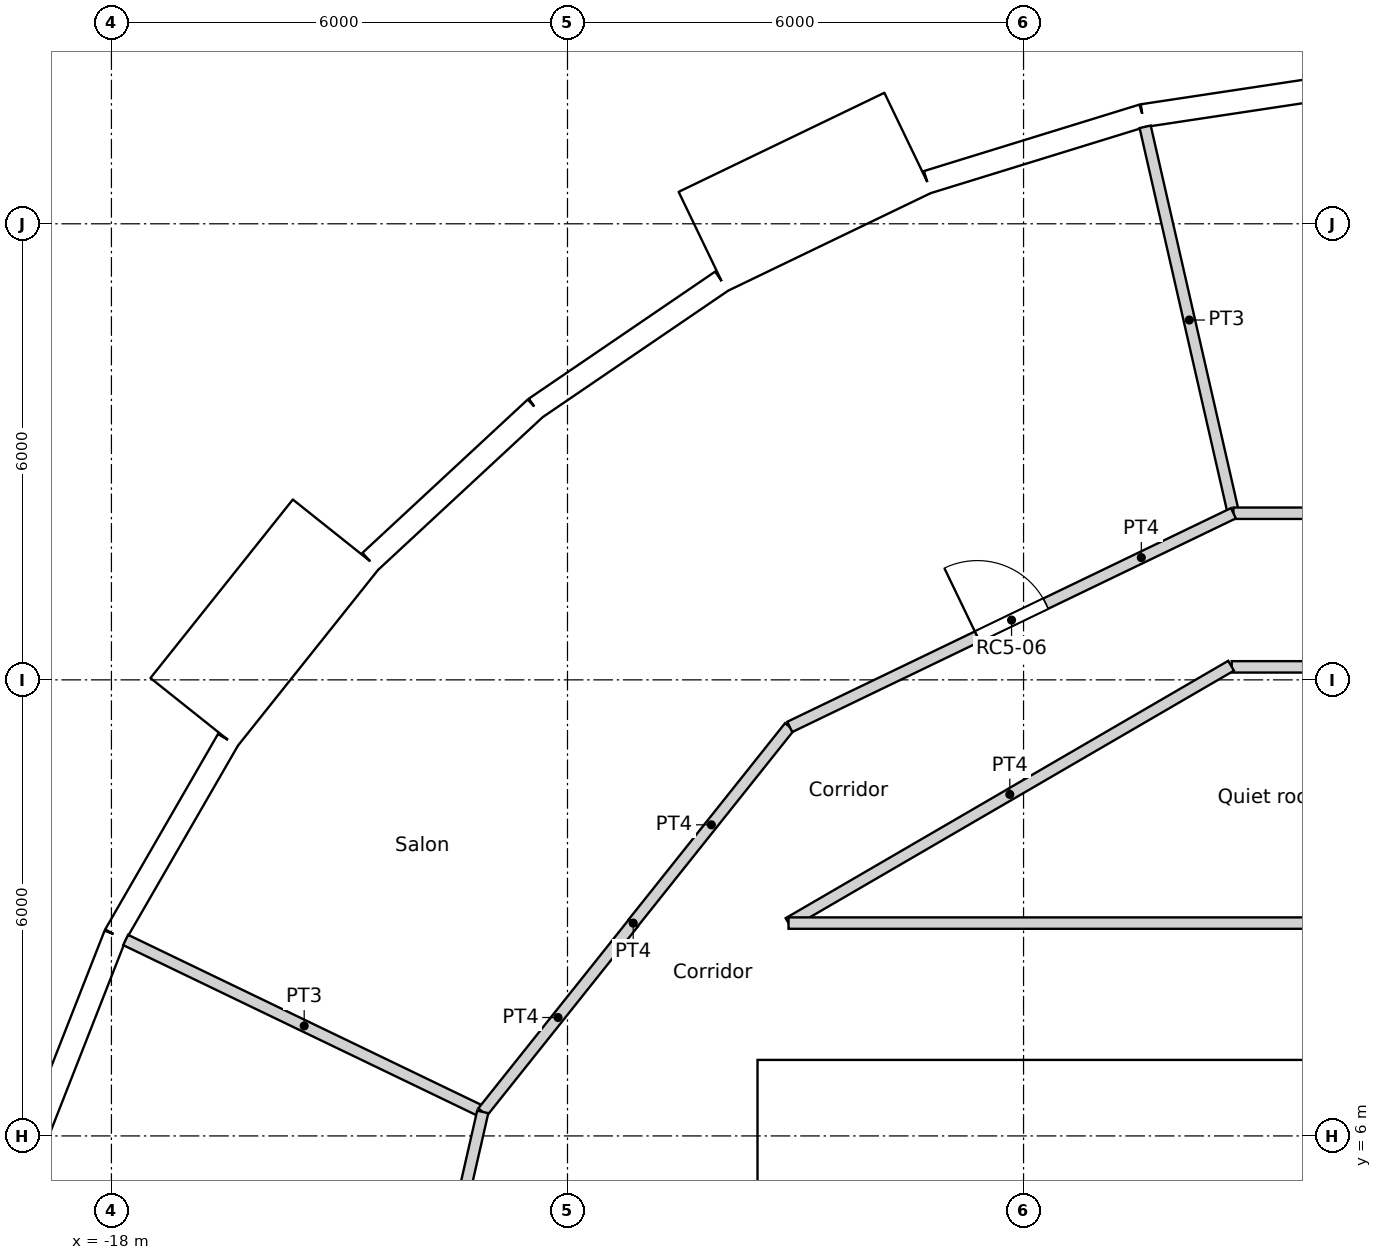
"""IFC4 building model, lengths in metres.
Left out: names, types, materials, properties, quantities, classifications, styles, units other than length and angle.
Written with IfcOpenShell. Run it as: python <this file> out.ifc"""

import sys

from ifc_helpers import new_model, si_unit, direction, frame, frame_2d, origin, origin_2d, place, context, subcontext, project, spatial, rectangle, circle, extrude, element, fill, save


model = new_model("IFC4")
c1 = context("Model", 3, precision=1e-05, world=origin(), true_north=direction((0.0, 1.0)))
c2 = subcontext(c1, "Body", "Model", "MODEL_VIEW")
j1 = project(units=[si_unit("LENGTHUNIT", "METRE"), si_unit("PLANEANGLEUNIT", "RADIAN")], contexts=[c1])
p1 = place(None, origin())
s1 = spatial("IfcSite", under=j1, at=p1, CompositionType="ELEMENT")
p2 = place(p1, origin())
s2 = spatial("IfcBuilding", under=s1, at=p2, CompositionType="ELEMENT")
p3 = place(p2, frame((0.0, 0.0, 270.6)))
s3 = spatial("IfcBuildingStorey", under=s2, at=p3, CompositionType="ELEMENT", Elevation=270.6)
for number, where, z_axis, x_axis in (
    (1, (-4.188, 18.35, 0.0), (0.0, 0.0, 1.0), (1.0, 0.0, 0.0)),
    (2, (-9.411, 16.301, 0.0), (0.0, 0.0, 1.0), (1.0, 0.0, 0.0)),
    (3, (-13.798, 12.802, 0.0), (0.0, 0.0, 1.0), (1.0, 0.0, 0.0)),
    (4, (-16.958, 8.167, 0.0), (0.0, 0.0, 1.0), (1.0, 0.0, 0.0)),
):
    element("IfcColumn", number, at=place(p3, frame(where, z_axis=z_axis, x_axis=x_axis)), inside=s3, PredefinedType="COLUMN", context=c2, shape_type="SweptSolid", body=[
        extrude(circle(Radius=0.55, at=origin_2d()), origin(), (0.0, 0.0, 1.0), 3.6),
    ])
p4 = place(p3, frame((-1.504, 19.864, 0.0), z_axis=(0.0, 0.0, 1.0), x_axis=(-0.988835775663, -0.149009425104, 0.0)))
e5 = element("IfcWall", 5, at=p4, inside=s3, PredefinedType="SOLIDWALL", context=c2, shape_type="SweptSolid", body=[
    extrude(rectangle(XDim=2.962, YDim=0.3, at=frame_2d((1.481, 0.0))), origin(), (0.0, 0.0, 1.0), 3.25),
])
p5 = place(p4, frame((1.481, 0.0, 1.55)))
e6 = element("IfcOpeningElement", 6, at=p5, cuts=e5, PredefinedType="OPENING", context=c2, shape_type="SweptSolid", body=[
    extrude(circle(Radius=0.9, at=origin_2d()), frame((0.0, 0.16, 0.0), z_axis=(0.0, -1.0, 0.0), x_axis=(1.0, 0.0, 0.0)), (0.0, 0.0, 1.0), 0.32),
])
p6 = place(p3, frame((-4.433, 19.422, 0.0), z_axis=(0.0, 0.0, 1.0), x_axis=(-0.955555982805, -0.29480970765, 0.0)))
e7 = element("IfcWall", 7, at=p6, inside=s3, PredefinedType="SOLIDWALL", context=c2, shape_type="SweptSolid", body=[
    extrude(rectangle(XDim=2.962, YDim=0.3, at=frame_2d((1.481, 0.0))), origin(), (0.0, 0.0, 1.0), 3.25),
])
p7 = place(p6, frame((1.481, 0.0, 1.55)))
e8 = element("IfcOpeningElement", 8, at=p7, cuts=e7, PredefinedType="OPENING", context=c2, shape_type="SweptSolid", body=[
    extrude(circle(Radius=0.9, at=origin_2d()), frame((0.0, 0.16, 0.0), z_axis=(0.0, -1.0, 0.0), x_axis=(1.0, 0.0, 0.0)), (0.0, 0.0, 1.0), 0.32),
])
p8 = place(p3, frame((-7.518, 19.068, -0.35), z_axis=(0.0, 0.0, 1.0), x_axis=(-0.900953362039, -0.433915935904, 0.0)))
e9 = element("IfcWall", 9, at=p8, inside=s3, PredefinedType="ELEMENTEDWALL", context=c2, shape_type="SweptSolid", body=[
    extrude(rectangle(XDim=3.0, YDim=1.45, at=frame_2d((1.5, 0.0))), origin(), (0.0, 0.0, 1.0), 3.6),
])
p9 = place(p8, frame((1.5, 0.0, 1.9)))
e10 = element("IfcOpeningElement", 10, at=p9, cuts=e9, PredefinedType="OPENING", context=c2, shape_type="SweptSolid", body=[
    extrude(circle(Radius=0.9, at=origin_2d()), frame((0.0, 0.735, 0.0), z_axis=(0.0, -1.0, 0.0), x_axis=(1.0, 0.0, 0.0)), (0.0, 0.0, 1.0), 1.47),
])
p10 = place(p3, frame((-9.974, 17.244, 0.0), z_axis=(0.0, 0.0, 1.0), x_axis=(-0.826236061068, -0.563324037646, 0.0)))
e11 = element("IfcWall", 11, at=p10, inside=s3, PredefinedType="SOLIDWALL", context=c2, shape_type="SweptSolid", body=[
    extrude(rectangle(XDim=2.962, YDim=0.3, at=frame_2d((1.481, 0.0))), origin(), (0.0, 0.0, 1.0), 3.25),
])
p11 = place(p10, frame((1.481, 0.0, 1.55)))
e12 = element("IfcOpeningElement", 12, at=p11, cuts=e11, PredefinedType="OPENING", context=c2, shape_type="SweptSolid", body=[
    extrude(circle(Radius=0.9, at=origin_2d()), frame((0.0, 0.16, 0.0), z_axis=(0.0, -1.0, 0.0), x_axis=(1.0, 0.0, 0.0)), (0.0, 0.0, 1.0), 0.32),
])
p12 = place(p3, frame((-12.421, 15.575, 0.0), z_axis=(0.0, 0.0, 1.0), x_axis=(-0.733028283666, -0.680198158882, 0.0)))
e13 = element("IfcWall", 13, at=p12, inside=s3, PredefinedType="SOLIDWALL", context=c2, shape_type="SweptSolid", body=[
    extrude(rectangle(XDim=2.962, YDim=0.3, at=frame_2d((1.481, 0.0))), origin(), (0.0, 0.0, 1.0), 3.25),
])
p13 = place(p12, frame((1.481, 0.0, 1.55)))
e14 = element("IfcOpeningElement", 14, at=p13, cuts=e13, PredefinedType="OPENING", context=c2, shape_type="SweptSolid", body=[
    extrude(circle(Radius=0.9, at=origin_2d()), frame((0.0, 0.16, 0.0), z_axis=(0.0, -1.0, 0.0), x_axis=(1.0, 0.0, 0.0)), (0.0, 0.0, 1.0), 0.32),
])
p14 = place(p3, frame((-15.046, 13.917, -0.35), z_axis=(0.0, 0.0, 1.0), x_axis=(-0.623523286312, -0.781804778335, 0.0)))
e15 = element("IfcWall", 15, at=p14, inside=s3, PredefinedType="ELEMENTEDWALL", context=c2, shape_type="SweptSolid", body=[
    extrude(rectangle(XDim=3.0, YDim=1.45, at=frame_2d((1.5, 0.0))), origin(), (0.0, 0.0, 1.0), 3.6),
])
p15 = place(p14, frame((1.5, 0.0, 1.9)))
e16 = element("IfcOpeningElement", 16, at=p15, cuts=e15, PredefinedType="OPENING", context=c2, shape_type="SweptSolid", body=[
    extrude(circle(Radius=0.9, at=origin_2d()), frame((0.0, 0.735, 0.0), z_axis=(0.0, -1.0, 0.0), x_axis=(1.0, 0.0, 0.0)), (0.0, 0.0, 1.0), 1.47),
])
p16 = place(p3, frame((-16.468, 11.209, 0.0), z_axis=(0.0, 0.0, 1.0), x_axis=(-0.500012570604, -0.866018146021, 0.0)))
e17 = element("IfcWall", 17, at=p16, inside=s3, PredefinedType="SOLIDWALL", context=c2, shape_type="SweptSolid", body=[
    extrude(rectangle(XDim=2.962, YDim=0.3, at=frame_2d((1.481, 0.0))), origin(), (0.0, 0.0, 1.0), 3.25),
])
p17 = place(p16, frame((1.481, 0.0, 1.55)))
e18 = element("IfcOpeningElement", 18, at=p17, cuts=e17, PredefinedType="OPENING", context=c2, shape_type="SweptSolid", body=[
    extrude(circle(Radius=0.9, at=origin_2d()), frame((0.0, 0.16, 0.0), z_axis=(0.0, -1.0, 0.0), x_axis=(1.0, 0.0, 0.0)), (0.0, 0.0, 1.0), 0.32),
])
p18 = place(p3, frame((-17.949, 8.644, 0.0), z_axis=(0.0, 0.0, 1.0), x_axis=(-0.365343821297, -0.930872650925, 0.0)))
e19 = element("IfcWall", 19, at=p18, inside=s3, PredefinedType="SOLIDWALL", context=c2, shape_type="SweptSolid", body=[
    extrude(rectangle(XDim=2.962, YDim=0.3, at=frame_2d((1.481, 0.0))), origin(), (0.0, 0.0, 1.0), 3.25),
])
p19 = place(p18, frame((1.481, 0.0, 1.55)))
e20 = element("IfcOpeningElement", 20, at=p19, cuts=e19, PredefinedType="OPENING", context=c2, shape_type="SweptSolid", body=[
    extrude(circle(Radius=0.9, at=origin_2d()), frame((0.0, 0.16, 0.0), z_axis=(0.0, -1.0, 0.0), x_axis=(1.0, 0.0, 0.0)), (0.0, 0.0, 1.0), 0.32),
])
p20 = place(p3, frame((-9.5, 6.7, 0.0), z_axis=(0.0, 0.0, 1.0), x_axis=(1.0, 0.0, 0.0)))
e21 = element("IfcWall", 21, at=p20, inside=s3, PredefinedType="SOLIDWALL", context=c2, shape_type="SweptSolid", body=[
    extrude(rectangle(XDim=19.0, YDim=0.6, at=frame_2d((9.5, 0.0))), origin(), (0.0, 0.0, 1.0), 3.6),
])
p21 = place(p20, frame((5.35, 0.0, 0.0)))
e22 = element("IfcOpeningElement", 22, at=p21, cuts=e21, PredefinedType="OPENING", context=c2, shape_type="SweptSolid", body=[
    extrude(rectangle(XDim=1.7, YDim=2.1, at=frame_2d((0.85, 1.05))), frame((0.0, 0.3, 0.0), z_axis=(0.0, -1.0, 0.0), x_axis=(1.0, 0.0, 0.0)), (0.0, 0.0, 1.0), 0.6),
])
p22 = place(p3, frame((-9.2, -6.4, 0.0), z_axis=(0.0, 0.0, 1.0), x_axis=(0.0, 1.0, 0.0)))
e23 = element("IfcWall", 23, at=p22, inside=s3, PredefinedType="SOLIDWALL", context=c2, shape_type="SweptSolid", body=[
    extrude(rectangle(XDim=12.8, YDim=0.6, at=frame_2d((6.4, 0.0))), origin(), (0.0, 0.0, 1.0), 3.6),
])
p23 = place(p3, frame((-2.25, 3.25, 0.0), z_axis=(0.0, 0.0, 1.0), x_axis=(0.0, 1.0, 0.0)))
e24 = element("IfcWall", 24, at=p23, inside=s3, PredefinedType="SOLIDWALL", context=c2, shape_type="SweptSolid", body=[
    extrude(rectangle(XDim=3.15, YDim=0.3, at=frame_2d((1.575, 0.0))), origin(), (0.0, 0.0, 1.0), 3.25),
])
p24 = place(p3, frame((-9.092, 8.8, 0.0), z_axis=(0.0, 0.0, 1.0), x_axis=(0.864470922103, 0.502682827277, 0.0)))
e25 = element("IfcWall", 25, at=p24, inside=s3, PredefinedType="PARTITIONING", context=c2, shape_type="SweptSolid", body=[
    extrude(rectangle(XDim=6.735, YDim=0.15, at=frame_2d((3.368, 0.0))), origin(), (0.0, 0.0, 1.0), 3.1),
])
p25 = place(p3, frame((-9.092, 8.8, 0.0), z_axis=(0.0, 0.0, 1.0), x_axis=(1.0, 0.0, 0.0)))
e26 = element("IfcWall", 26, at=p25, inside=s3, PredefinedType="PARTITIONING", context=c2, shape_type="SweptSolid", body=[
    extrude(rectangle(XDim=18.193, YDim=0.15, at=frame_2d((9.096, 0.0))), origin(), (0.0, 0.0, 1.0), 3.1),
])
p26 = place(p25, frame((8.592, 0.0, 0.0)))
e27 = element("IfcOpeningElement", 27, at=p26, cuts=e26, PredefinedType="OPENING", context=c2, shape_type="SweptSolid", body=[
    extrude(rectangle(XDim=1.0, YDim=2.04, at=frame_2d((0.5, 1.02))), frame((0.0, 0.075, 0.0), z_axis=(0.0, -1.0, 0.0), x_axis=(1.0, 0.0, 0.0)), (0.0, 0.0, 1.0), 0.15),
])
p27 = place(p3, frame((-11.134, 8.8, 0.0), z_axis=(0.0, 0.0, 1.0), x_axis=(-1.0, 0.0, 0.0)))
e28 = element("IfcWall", 28, at=p27, inside=s3, PredefinedType="PARTITIONING", context=c2, shape_type="SweptSolid", body=[
    extrude(rectangle(XDim=0.003, YDim=0.15, at=frame_2d((0.001, 0.0))), origin(), (0.0, 0.0, 1.0), 3.1),
])
p28 = place(p3, frame((-11.136, 8.802, 0.0), z_axis=(0.0, 0.0, 1.0), x_axis=(0.623151397235, 0.782101231379, 0.0)))
e29 = element("IfcWall", 29, at=p28, inside=s3, PredefinedType="PARTITIONING", context=c2, shape_type="SweptSolid", body=[
    extrude(rectangle(XDim=3.301, YDim=0.15, at=frame_2d((1.65, 0.0))), origin(), (0.0, 0.0, 1.0), 3.1),
])
p29 = place(p3, frame((-3.261, 12.171, 0.0), z_axis=(0.0, 0.0, 1.0), x_axis=(1.0, 0.0, 0.0)))
e30 = element("IfcWall", 30, at=p29, inside=s3, PredefinedType="PARTITIONING", context=c2, shape_type="SweptSolid", body=[
    extrude(rectangle(XDim=6.522, YDim=0.15, at=frame_2d((3.261, 0.0))), origin(), (0.0, 0.0, 1.0), 3.1),
])
p30 = place(p3, frame((-3.239, 14.192, 0.0), z_axis=(0.0, 0.0, 1.0), x_axis=(1.0, 0.0, 0.0)))
e31 = element("IfcWall", 31, at=p30, inside=s3, PredefinedType="PARTITIONING", context=c2, shape_type="SweptSolid", body=[
    extrude(rectangle(XDim=6.478, YDim=0.15, at=frame_2d((3.239, 0.0))), origin(), (0.0, 0.0, 1.0), 3.1),
])
p31 = place(p3, frame((-9.076, 11.381, 0.0), z_axis=(0.0, 0.0, 1.0), x_axis=(0.900976027191, 0.433868872388, 0.0)))
e32 = element("IfcWall", 32, at=p31, inside=s3, PredefinedType="PARTITIONING", context=c2, shape_type="SweptSolid", body=[
    extrude(rectangle(XDim=6.479, YDim=0.15, at=frame_2d((3.239, 0.0))), origin(), (0.0, 0.0, 1.0), 3.1),
])
p32 = place(p31, frame((2.739, 0.0, 0.0)))
e33 = element("IfcOpeningElement", 33, at=p32, cuts=e32, PredefinedType="OPENING", context=c2, shape_type="SweptSolid", body=[
    extrude(rectangle(XDim=1.0, YDim=2.04, at=frame_2d((0.5, 1.02))), frame((0.0, 0.075, 0.0), z_axis=(0.0, -1.0, 0.0), x_axis=(1.0, 0.0, 0.0)), (0.0, 0.0, 1.0), 0.15),
])
p33 = place(p3, frame((-13.115, 6.316, 0.0), z_axis=(0.0, 0.0, 1.0), x_axis=(0.623476099415, 0.781842409606, 0.0)))
e34 = element("IfcWall", 34, at=p33, inside=s3, PredefinedType="PARTITIONING", context=c2, shape_type="SweptSolid", body=[
    extrude(rectangle(XDim=3.177, YDim=0.15, at=frame_2d((1.589, 0.0))), origin(), (0.0, 0.0, 1.0), 3.1),
])
p34 = place(p3, frame((-14.557, 0.0, 0.0), z_axis=(0.0, 0.0, 1.0), x_axis=(0.222568978642, 0.97491694505, 0.0)))
e35 = element("IfcWall", 35, at=p34, inside=s3, PredefinedType="PARTITIONING", context=c2, shape_type="SweptSolid", body=[
    extrude(rectangle(XDim=6.479, YDim=0.15, at=frame_2d((3.239, 0.0))), origin(), (0.0, 0.0, 1.0), 3.1),
])
p35 = place(p3, frame((-4.4, 19.276, 0.0), z_axis=(0.0, 0.0, 1.0), x_axis=(0.222612505682, -0.974907007008, 0.0)))
e36 = element("IfcWall", 36, at=p35, inside=s3, PredefinedType="PARTITIONING", context=c2, shape_type="SweptSolid", body=[
    extrude(rectangle(XDim=5.215, YDim=0.15, at=frame_2d((2.607, 0.0))), origin(), (0.0, 0.0, 1.0), 3.1),
])
p36 = place(p3, frame((-17.813, 8.578, 0.0), z_axis=(0.0, 0.0, 1.0), x_axis=(0.901004381064, -0.433809987557, 0.0)))
e37 = element("IfcWall", 37, at=p36, inside=s3, PredefinedType="PARTITIONING", context=c2, shape_type="SweptSolid", body=[
    extrude(rectangle(XDim=5.214, YDim=0.15, at=frame_2d((2.607, 0.0))), origin(), (0.0, 0.0, 1.0), 3.1),
])
p37 = place(p5, origin())
e38 = element("IfcWindow", 38, at=p37, inside=s3, PartitioningType="SINGLE_PANEL", PredefinedType="WINDOW", context=c2, shape_type="SweptSolid", body=[
    extrude(circle(Radius=0.9, at=origin_2d()), frame((0.0, 0.12, 0.0), z_axis=(0.0, -1.0, 0.0), x_axis=(1.0, 0.0, 0.0)), (0.0, 0.0, 1.0), 0.1),
])
fill(e6, e38)
p38 = place(p7, origin())
e39 = element("IfcWindow", 39, at=p38, inside=s3, PartitioningType="SINGLE_PANEL", PredefinedType="WINDOW", context=c2, shape_type="SweptSolid", body=[
    extrude(circle(Radius=0.9, at=origin_2d()), frame((0.0, 0.12, 0.0), z_axis=(0.0, -1.0, 0.0), x_axis=(1.0, 0.0, 0.0)), (0.0, 0.0, 1.0), 0.1),
])
fill(e8, e39)
p39 = place(p9, origin())
e40 = element("IfcWindow", 40, at=p39, inside=s3, PartitioningType="SINGLE_PANEL", PredefinedType="WINDOW", context=c2, shape_type="SweptSolid", body=[
    extrude(circle(Radius=0.9, at=origin_2d()), frame((0.0, 0.695, 0.0), z_axis=(0.0, -1.0, 0.0), x_axis=(1.0, 0.0, 0.0)), (0.0, 0.0, 1.0), 0.1),
])
fill(e10, e40)
p40 = place(p11, origin())
e41 = element("IfcWindow", 41, at=p40, inside=s3, PartitioningType="SINGLE_PANEL", PredefinedType="WINDOW", context=c2, shape_type="SweptSolid", body=[
    extrude(circle(Radius=0.9, at=origin_2d()), frame((0.0, 0.12, 0.0), z_axis=(0.0, -1.0, 0.0), x_axis=(1.0, 0.0, 0.0)), (0.0, 0.0, 1.0), 0.1),
])
fill(e12, e41)
p41 = place(p13, origin())
e42 = element("IfcWindow", 42, at=p41, inside=s3, PartitioningType="SINGLE_PANEL", PredefinedType="WINDOW", context=c2, shape_type="SweptSolid", body=[
    extrude(circle(Radius=0.9, at=origin_2d()), frame((0.0, 0.12, 0.0), z_axis=(0.0, -1.0, 0.0), x_axis=(1.0, 0.0, 0.0)), (0.0, 0.0, 1.0), 0.1),
])
fill(e14, e42)
p42 = place(p15, origin())
e43 = element("IfcWindow", 43, at=p42, inside=s3, PartitioningType="SINGLE_PANEL", PredefinedType="WINDOW", context=c2, shape_type="SweptSolid", body=[
    extrude(circle(Radius=0.9, at=origin_2d()), frame((0.0, 0.695, 0.0), z_axis=(0.0, -1.0, 0.0), x_axis=(1.0, 0.0, 0.0)), (0.0, 0.0, 1.0), 0.1),
])
fill(e16, e43)
p43 = place(p17, origin())
e44 = element("IfcWindow", 44, at=p43, inside=s3, PartitioningType="SINGLE_PANEL", PredefinedType="WINDOW", context=c2, shape_type="SweptSolid", body=[
    extrude(circle(Radius=0.9, at=origin_2d()), frame((0.0, 0.12, 0.0), z_axis=(0.0, -1.0, 0.0), x_axis=(1.0, 0.0, 0.0)), (0.0, 0.0, 1.0), 0.1),
])
fill(e18, e44)
p44 = place(p19, origin())
e45 = element("IfcWindow", 45, at=p44, inside=s3, PartitioningType="SINGLE_PANEL", PredefinedType="WINDOW", context=c2, shape_type="SweptSolid", body=[
    extrude(circle(Radius=0.9, at=origin_2d()), frame((0.0, 0.12, 0.0), z_axis=(0.0, -1.0, 0.0), x_axis=(1.0, 0.0, 0.0)), (0.0, 0.0, 1.0), 0.1),
])
fill(e20, e45)
p45 = place(p21, origin())
e46 = element("IfcDoor", 46, at=p45, inside=s3, OperationType="DOUBLE_DOOR_SINGLE_SWING", PredefinedType="DOOR", context=c2, shape_type="SweptSolid", body=[
    extrude(rectangle(XDim=1.7, YDim=2.1, at=frame_2d((0.85, 1.05))), frame((0.0, 0.025, 0.0), z_axis=(0.0, -1.0, 0.0), x_axis=(1.0, 0.0, 0.0)), (0.0, 0.0, 1.0), 0.05),
])
fill(e22, e46)
p46 = place(p32, origin())
e47 = element("IfcDoor", 47, at=p46, inside=s3, OperationType="SINGLE_SWING_LEFT", PredefinedType="DOOR", context=c2, shape_type="SweptSolid", body=[
    extrude(rectangle(XDim=1.0, YDim=2.04, at=frame_2d((0.5, 1.02))), frame((0.0, 0.025, 0.0), z_axis=(0.0, -1.0, 0.0), x_axis=(1.0, 0.0, 0.0)), (0.0, 0.0, 1.0), 0.05),
])
fill(e33, e47)
save(model, sys.argv[1])
